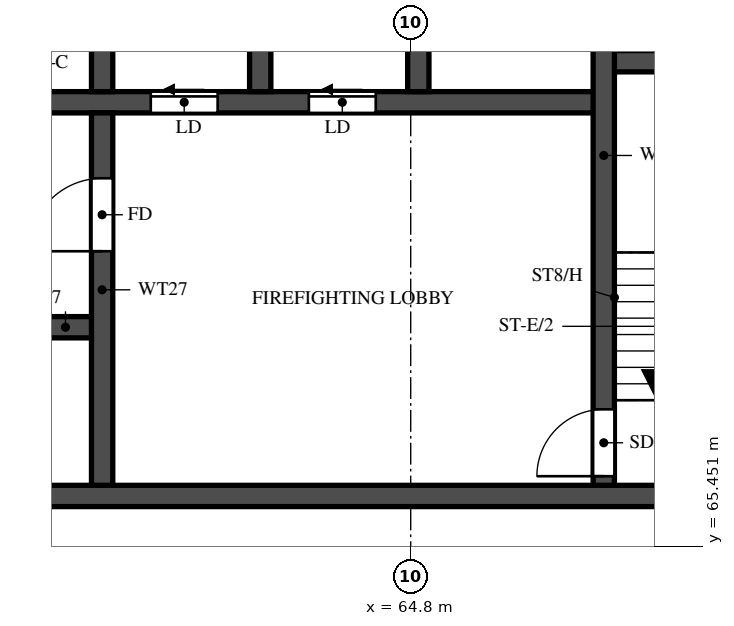
"""IFC4 building model, lengths in metres.
Left out: names, types, materials, properties, quantities, classifications, styles, units other than length and angle.
Written with IfcOpenShell. Run it as: python <this file> out.ifc"""

import sys

from ifc_helpers import new_model, si_unit, direction, frame, frame_2d, origin, place, context, subcontext, project, spatial, rectangle, extrude, element, fill, save


model = new_model("IFC4")
c1 = context("Model", 3, precision=1e-05, world=origin(), true_north=direction((0.0, 1.0)))
c2 = subcontext(c1, "Body", "Model", "MODEL_VIEW")
j1 = project(units=[si_unit("LENGTHUNIT", "METRE"), si_unit("PLANEANGLEUNIT", "RADIAN")], contexts=[c1])
p1 = place(None, origin())
s1 = spatial("IfcSite", under=j1, at=p1, CompositionType="ELEMENT")
p2 = place(p1, origin())
s2 = spatial("IfcBuilding", under=s1, at=p2, CompositionType="ELEMENT")
p3 = place(p2, frame((0.0, 0.0, 195.5)))
s3 = spatial("IfcBuildingStorey", under=s2, at=p3, CompositionType="ELEMENT", Elevation=195.5)
p4 = place(p3, frame((29.7, 66.275, 0.0), z_axis=(0.0, 0.0, 1.0), x_axis=(1.0, 0.0, 0.0)))
e1 = element("IfcWall", 1, at=p4, inside=s3, PredefinedType="SHEAR", context=c2, shape_type="SweptSolid", body=[
    extrude(rectangle(XDim=41.4, YDim=0.35, at=frame_2d((20.7, 0.0))), origin(), (0.0, 0.0, 1.0), 3.2),
])
p5 = place(p4, frame((0.925, 0.0, 0.0)))
e2 = element("IfcOpeningElement", 2, at=p5, cuts=e1, PredefinedType="OPENING", context=c2, shape_type="SweptSolid", body=[
    extrude(rectangle(XDim=1.1, YDim=2.1, at=frame_2d((0.55, 1.05))), frame((0.0, 0.185, 0.0), z_axis=(0.0, -1.0, 0.0), x_axis=(1.0, 0.0, 0.0)), (0.0, 0.0, 1.0), 0.37),
])
p6 = place(p4, frame((3.712, 0.0, 0.0)))
e3 = element("IfcOpeningElement", 3, at=p6, cuts=e1, PredefinedType="OPENING", context=c2, shape_type="SweptSolid", body=[
    extrude(rectangle(XDim=1.8, YDim=2.1, at=frame_2d((0.9, 1.05))), frame((0.0, 0.185, 0.0), z_axis=(0.0, -1.0, 0.0), x_axis=(1.0, 0.0, 0.0)), (0.0, 0.0, 1.0), 0.37),
])
p7 = place(p3, frame((35.625, 69.05, 0.0), z_axis=(0.0, 0.0, 1.0), x_axis=(1.0, 0.0, 0.0)))
e4 = element("IfcWall", 4, at=p7, inside=s3, PredefinedType="SHEAR", context=c2, shape_type="SweptSolid", body=[
    extrude(rectangle(XDim=24.1, YDim=0.35, at=frame_2d((12.05, 0.0))), origin(), (0.0, 0.0, 1.0), 3.2),
])
p8 = place(p7, frame((1.0, 0.0, 0.0)))
e5 = element("IfcOpeningElement", 5, at=p8, cuts=e4, PredefinedType="OPENING", context=c2, shape_type="SweptSolid", body=[
    extrude(rectangle(XDim=1.1, YDim=2.1, at=frame_2d((0.55, 1.05))), frame((0.0, 0.185, 0.0), z_axis=(0.0, -1.0, 0.0), x_axis=(1.0, 0.0, 0.0)), (0.0, 0.0, 1.0), 0.37),
])
p9 = place(p7, frame((3.75, 0.0, 0.0)))
e6 = element("IfcOpeningElement", 6, at=p9, cuts=e4, PredefinedType="OPENING", context=c2, shape_type="SweptSolid", body=[
    extrude(rectangle(XDim=1.1, YDim=2.1, at=frame_2d((0.55, 1.05))), frame((0.0, 0.185, 0.0), z_axis=(0.0, -1.0, 0.0), x_axis=(1.0, 0.0, 0.0)), (0.0, 0.0, 1.0), 0.37),
])
p10 = place(p7, frame((6.5, 0.0, 0.0)))
e7 = element("IfcOpeningElement", 7, at=p10, cuts=e4, PredefinedType="OPENING", context=c2, shape_type="SweptSolid", body=[
    extrude(rectangle(XDim=1.1, YDim=2.1, at=frame_2d((0.55, 1.05))), frame((0.0, 0.185, 0.0), z_axis=(0.0, -1.0, 0.0), x_axis=(1.0, 0.0, 0.0)), (0.0, 0.0, 1.0), 0.37),
])
p11 = place(p7, frame((9.25, 0.0, 0.0)))
e8 = element("IfcOpeningElement", 8, at=p11, cuts=e4, PredefinedType="OPENING", context=c2, shape_type="SweptSolid", body=[
    extrude(rectangle(XDim=1.1, YDim=2.1, at=frame_2d((0.55, 1.05))), frame((0.0, 0.185, 0.0), z_axis=(0.0, -1.0, 0.0), x_axis=(1.0, 0.0, 0.0)), (0.0, 0.0, 1.0), 0.37),
])
p12 = place(p7, frame((12.0, 0.0, 0.0)))
e9 = element("IfcOpeningElement", 9, at=p12, cuts=e4, PredefinedType="OPENING", context=c2, shape_type="SweptSolid", body=[
    extrude(rectangle(XDim=1.1, YDim=2.1, at=frame_2d((0.55, 1.05))), frame((0.0, 0.185, 0.0), z_axis=(0.0, -1.0, 0.0), x_axis=(1.0, 0.0, 0.0)), (0.0, 0.0, 1.0), 0.37),
])
p13 = place(p7, frame((14.75, 0.0, 0.0)))
e10 = element("IfcOpeningElement", 10, at=p13, cuts=e4, PredefinedType="OPENING", context=c2, shape_type="SweptSolid", body=[
    extrude(rectangle(XDim=1.1, YDim=2.1, at=frame_2d((0.55, 1.05))), frame((0.0, 0.185, 0.0), z_axis=(0.0, -1.0, 0.0), x_axis=(1.0, 0.0, 0.0)), (0.0, 0.0, 1.0), 0.37),
])
p14 = place(p7, frame((17.625, 0.0, 0.0)))
e11 = element("IfcOpeningElement", 11, at=p14, cuts=e4, PredefinedType="OPENING", context=c2, shape_type="SweptSolid", body=[
    extrude(rectangle(XDim=1.1, YDim=2.1, at=frame_2d((0.55, 1.05))), frame((0.0, 0.185, 0.0), z_axis=(0.0, -1.0, 0.0), x_axis=(1.0, 0.0, 0.0)), (0.0, 0.0, 1.0), 0.37),
])
p15 = place(p7, frame((20.625, 0.0, 0.0)))
e12 = element("IfcOpeningElement", 12, at=p15, cuts=e4, PredefinedType="OPENING", context=c2, shape_type="SweptSolid", body=[
    extrude(rectangle(XDim=1.1, YDim=2.1, at=frame_2d((0.55, 1.05))), frame((0.0, 0.185, 0.0), z_axis=(0.0, -1.0, 0.0), x_axis=(1.0, 0.0, 0.0)), (0.0, 0.0, 1.0), 0.37),
])
p16 = place(p3, frame((32.825, 72.75, 0.0), z_axis=(0.0, 0.0, 1.0), x_axis=(1.0, 0.0, 0.0)))
e13 = element("IfcWall", 13, at=p16, inside=s3, PredefinedType="SHEAR", context=c2, shape_type="SweptSolid", body=[
    extrude(rectangle(XDim=35.15, YDim=0.35, at=frame_2d((17.575, 0.0))), origin(), (0.0, 0.0, 1.0), 3.2),
])
p17 = place(p16, frame((19.8, 0.0, 0.0)))
e14 = element("IfcOpeningElement", 14, at=p17, cuts=e13, PredefinedType="OPENING", context=c2, shape_type="SweptSolid", body=[
    extrude(rectangle(XDim=1.1, YDim=2.1, at=frame_2d((0.55, 1.05))), frame((0.0, 0.185, 0.0), z_axis=(0.0, -1.0, 0.0), x_axis=(1.0, 0.0, 0.0)), (0.0, 0.0, 1.0), 0.37),
])
p18 = place(p16, frame((27.7, 0.0, 0.0)))
e15 = element("IfcOpeningElement", 15, at=p18, cuts=e13, PredefinedType="OPENING", context=c2, shape_type="SweptSolid", body=[
    extrude(rectangle(XDim=1.1, YDim=2.1, at=frame_2d((0.55, 1.05))), frame((0.0, 0.185, 0.0), z_axis=(0.0, -1.0, 0.0), x_axis=(1.0, 0.0, 0.0)), (0.0, 0.0, 1.0), 0.37),
])
p19 = place(p16, frame((30.3, 0.0, 0.0)))
e16 = element("IfcOpeningElement", 16, at=p19, cuts=e13, PredefinedType="OPENING", context=c2, shape_type="SweptSolid", body=[
    extrude(rectangle(XDim=1.1, YDim=2.1, at=frame_2d((0.55, 1.05))), frame((0.0, 0.185, 0.0), z_axis=(0.0, -1.0, 0.0), x_axis=(1.0, 0.0, 0.0)), (0.0, 0.0, 1.0), 0.37),
])
p20 = place(p16, frame((3.8, 0.0, 0.0)))
e17 = element("IfcOpeningElement", 17, at=p20, cuts=e13, PredefinedType="OPENING", context=c2, shape_type="SweptSolid", body=[
    extrude(rectangle(XDim=1.1, YDim=2.1, at=frame_2d((0.55, 1.05))), frame((0.0, 0.185, 0.0), z_axis=(0.0, -1.0, 0.0), x_axis=(1.0, 0.0, 0.0)), (0.0, 0.0, 1.0), 0.37),
])
p21 = place(p16, frame((6.55, 0.0, 0.0)))
e18 = element("IfcOpeningElement", 18, at=p21, cuts=e13, PredefinedType="OPENING", context=c2, shape_type="SweptSolid", body=[
    extrude(rectangle(XDim=1.1, YDim=2.1, at=frame_2d((0.55, 1.05))), frame((0.0, 0.185, 0.0), z_axis=(0.0, -1.0, 0.0), x_axis=(1.0, 0.0, 0.0)), (0.0, 0.0, 1.0), 0.37),
])
p22 = place(p16, frame((9.3, 0.0, 0.0)))
e19 = element("IfcOpeningElement", 19, at=p22, cuts=e13, PredefinedType="OPENING", context=c2, shape_type="SweptSolid", body=[
    extrude(rectangle(XDim=1.1, YDim=2.1, at=frame_2d((0.55, 1.05))), frame((0.0, 0.185, 0.0), z_axis=(0.0, -1.0, 0.0), x_axis=(1.0, 0.0, 0.0)), (0.0, 0.0, 1.0), 0.37),
])
p23 = place(p16, frame((12.05, 0.0, 0.0)))
e20 = element("IfcOpeningElement", 20, at=p23, cuts=e13, PredefinedType="OPENING", context=c2, shape_type="SweptSolid", body=[
    extrude(rectangle(XDim=1.1, YDim=2.1, at=frame_2d((0.55, 1.05))), frame((0.0, 0.185, 0.0), z_axis=(0.0, -1.0, 0.0), x_axis=(1.0, 0.0, 0.0)), (0.0, 0.0, 1.0), 0.37),
])
p24 = place(p16, frame((14.8, 0.0, 0.0)))
e21 = element("IfcOpeningElement", 21, at=p24, cuts=e13, PredefinedType="OPENING", context=c2, shape_type="SweptSolid", body=[
    extrude(rectangle(XDim=1.1, YDim=2.1, at=frame_2d((0.55, 1.05))), frame((0.0, 0.185, 0.0), z_axis=(0.0, -1.0, 0.0), x_axis=(1.0, 0.0, 0.0)), (0.0, 0.0, 1.0), 0.37),
])
p25 = place(p16, frame((17.55, 0.0, 0.0)))
e22 = element("IfcOpeningElement", 22, at=p25, cuts=e13, PredefinedType="OPENING", context=c2, shape_type="SweptSolid", body=[
    extrude(rectangle(XDim=1.1, YDim=2.1, at=frame_2d((0.55, 1.05))), frame((0.0, 0.185, 0.0), z_axis=(0.0, -1.0, 0.0), x_axis=(1.0, 0.0, 0.0)), (0.0, 0.0, 1.0), 0.37),
])
p26 = place(p16, frame((0.938, 0.0, 0.0)))
e23 = element("IfcOpeningElement", 23, at=p26, cuts=e13, PredefinedType="OPENING", context=c2, shape_type="SweptSolid", body=[
    extrude(rectangle(XDim=1.1, YDim=2.1, at=frame_2d((0.55, 1.05))), frame((0.0, 0.185, 0.0), z_axis=(0.0, -1.0, 0.0), x_axis=(1.0, 0.0, 0.0)), (0.0, 0.0, 1.0), 0.37),
])
p27 = place(p3, frame((67.975, 73.425, 0.0), z_axis=(0.0, 0.0, 1.0), x_axis=(1.0, 0.0, 0.0)))
e24 = element("IfcWall", 24, at=p27, inside=s3, PredefinedType="SHEAR", context=c2, shape_type="SweptSolid", body=[
    extrude(rectangle(XDim=3.125, YDim=0.35, at=frame_2d((1.562, 0.0))), origin(), (0.0, 0.0, 1.0), 3.2),
])
p28 = place(p3, frame((67.975, 66.45, 0.0), z_axis=(0.0, 0.0, 1.0), x_axis=(0.0, 1.0, 0.0)))
e25 = element("IfcWall", 25, at=p28, inside=s3, PredefinedType="SHEAR", context=c2, shape_type="SweptSolid", body=[
    extrude(rectangle(XDim=10.85, YDim=0.35, at=frame_2d((5.425, 0.0))), origin(), (0.0, 0.0, 1.0), 3.2),
])
p29 = place(p28, frame((0.15, 0.0, 0.0)))
e26 = element("IfcOpeningElement", 26, at=p29, cuts=e25, PredefinedType="OPENING", context=c2, shape_type="SweptSolid", body=[
    extrude(rectangle(XDim=1.1, YDim=2.1, at=frame_2d((0.55, 1.05))), frame((0.0, 0.185, 0.0), z_axis=(0.0, -1.0, 0.0), x_axis=(1.0, 0.0, 0.0)), (0.0, 0.0, 1.0), 0.37),
])
p30 = place(p3, frame((59.725, 66.45, 0.0), z_axis=(0.0, 0.0, 1.0), x_axis=(0.0, 1.0, 0.0)))
e27 = element("IfcWall", 27, at=p30, inside=s3, PredefinedType="SHEAR", context=c2, shape_type="SweptSolid", body=[
    extrude(rectangle(XDim=6.125, YDim=0.35, at=frame_2d((3.062, 0.0))), origin(), (0.0, 0.0, 1.0), 3.2),
])
p31 = place(p30, frame((3.85, 0.0, 0.0)))
e28 = element("IfcOpeningElement", 28, at=p31, cuts=e27, PredefinedType="OPENING", context=c2, shape_type="SweptSolid", body=[
    extrude(rectangle(XDim=1.2, YDim=2.1, at=frame_2d((0.6, 1.05))), frame((0.0, 0.185, 0.0), z_axis=(0.0, -1.0, 0.0), x_axis=(1.0, 0.0, 0.0)), (0.0, 0.0, 1.0), 0.37),
])
for number, where, z_axis, x_axis in (
    (29, (59.725, 72.925, 0.0), (0.0, 0.0, 1.0), (0.0, 1.0, 0.0)),
    (30, (62.325, 72.925, 0.0), (0.0, 0.0, 1.0), (0.0, 1.0, 0.0)),
    (31, (64.925, 72.925, 0.0), (0.0, 0.0, 1.0), (0.0, 1.0, 0.0)),
):
    element("IfcWall", number, at=place(p3, frame(where, z_axis=z_axis, x_axis=x_axis)), inside=s3, PredefinedType="SHEAR", context=c2, shape_type="SweptSolid", body=[
        extrude(rectangle(XDim=2.95, YDim=0.35, at=frame_2d((1.475, 0.0))), origin(), (0.0, 0.0, 1.0), 3.2),
    ])
p32 = place(p29, origin())
e32 = element("IfcDoor", 32, at=p32, inside=s3, OperationType="SINGLE_SWING_LEFT", PredefinedType="DOOR", context=c2, shape_type="SweptSolid", body=[
    extrude(rectangle(XDim=1.1, YDim=2.1, at=frame_2d((0.55, 1.05))), frame((0.0, 0.025, 0.0), z_axis=(0.0, -1.0, 0.0), x_axis=(1.0, 0.0, 0.0)), (0.0, 0.0, 1.0), 0.05),
])
fill(e26, e32)
p33 = place(p31, origin())
e33 = element("IfcDoor", 33, at=p33, inside=s3, OperationType="SINGLE_SWING_LEFT", PredefinedType="DOOR", context=c2, shape_type="SweptSolid", body=[
    extrude(rectangle(XDim=1.2, YDim=2.1, at=frame_2d((0.6, 1.05))), frame((0.0, 0.025, 0.0), z_axis=(0.0, -1.0, 0.0), x_axis=(1.0, 0.0, 0.0)), (0.0, 0.0, 1.0), 0.05),
])
fill(e28, e33)
p34 = place(p18, origin())
e34 = element("IfcDoor", 34, at=p34, inside=s3, OperationType="SLIDING_TO_LEFT", PredefinedType="DOOR", context=c2, shape_type="SweptSolid", body=[
    extrude(rectangle(XDim=1.1, YDim=2.1, at=frame_2d((0.55, 1.05))), frame((0.0, 0.025, 0.0), z_axis=(0.0, -1.0, 0.0), x_axis=(1.0, 0.0, 0.0)), (0.0, 0.0, 1.0), 0.05),
])
fill(e15, e34)
p35 = place(p19, origin())
e35 = element("IfcDoor", 35, at=p35, inside=s3, OperationType="SLIDING_TO_LEFT", PredefinedType="DOOR", context=c2, shape_type="SweptSolid", body=[
    extrude(rectangle(XDim=1.1, YDim=2.1, at=frame_2d((0.55, 1.05))), frame((0.0, 0.025, 0.0), z_axis=(0.0, -1.0, 0.0), x_axis=(1.0, 0.0, 0.0)), (0.0, 0.0, 1.0), 0.05),
])
fill(e16, e35)
save(model, sys.argv[1])
